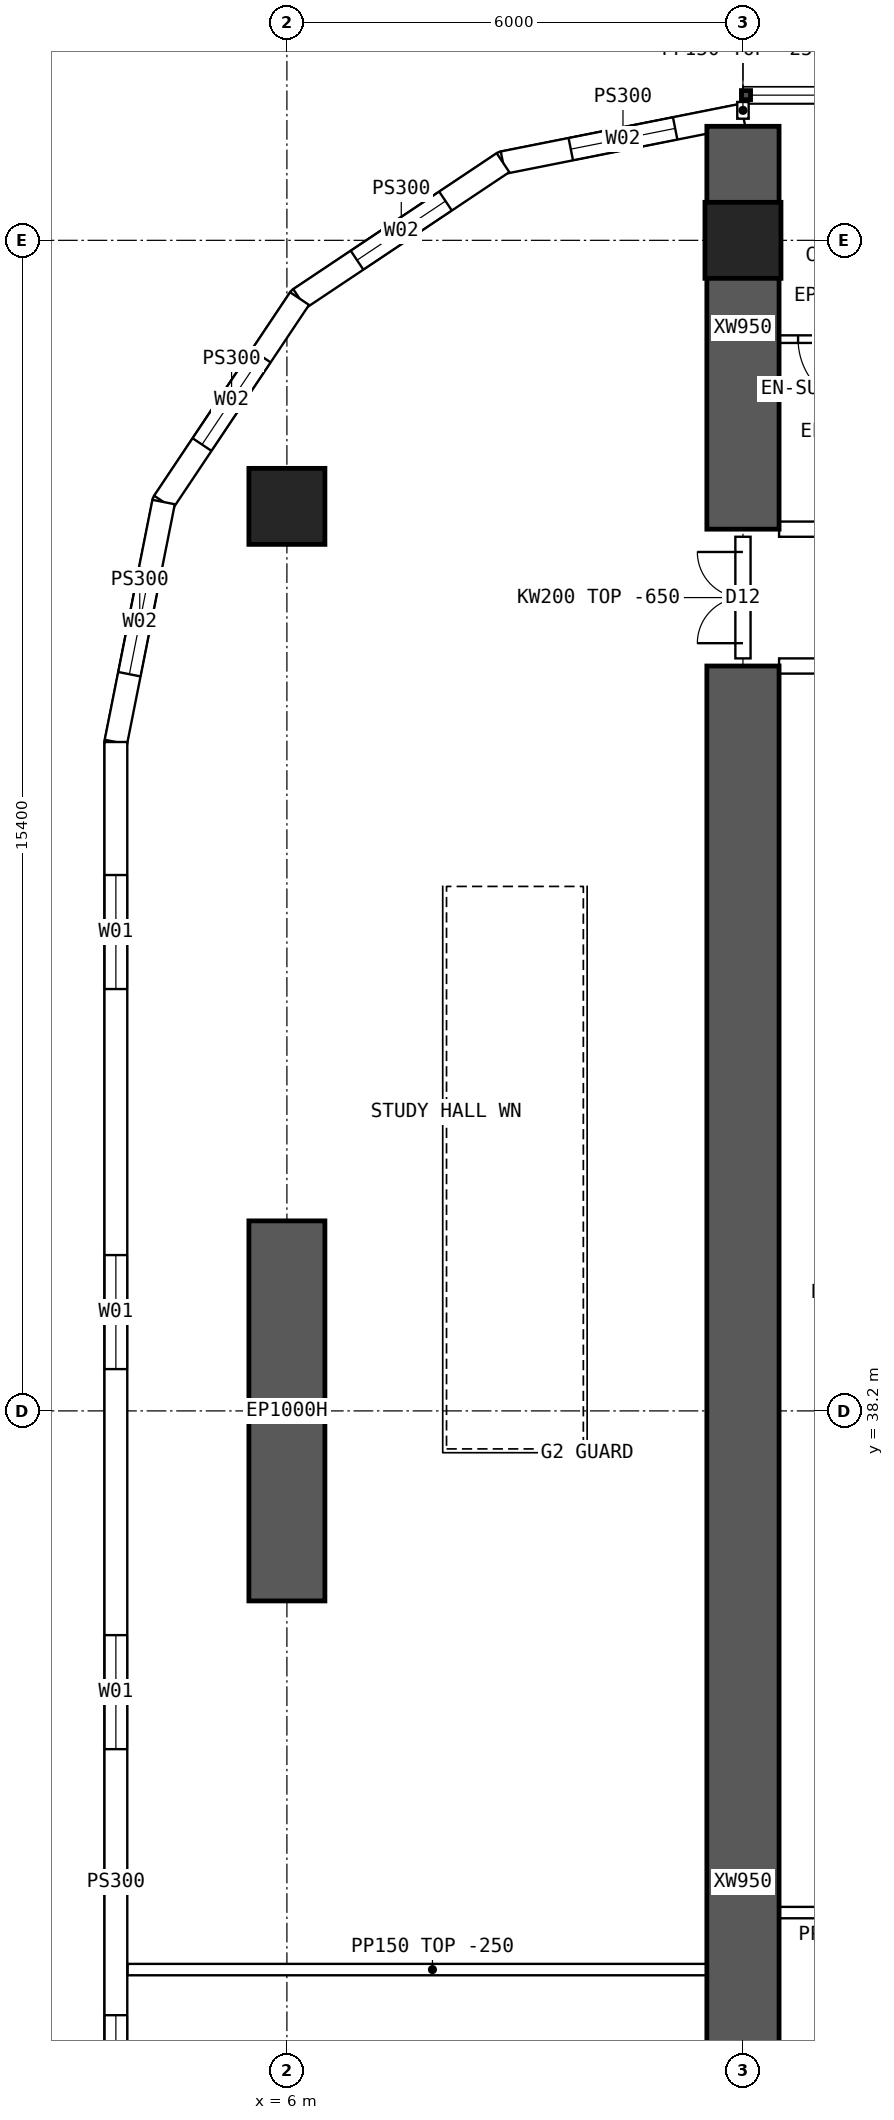
"""IFC4 building model, lengths in metres.
Left out: names, types, materials, properties, quantities, classifications, styles, units other than length and angle.
Written with IfcOpenShell. Run it as: python <this file> out.ifc"""

import sys

from ifc_helpers import new_model, si_unit, direction, frame, frame_2d, origin, origin_2d, place, context, subcontext, project, spatial, polyline, rectangle, hollow_rectangle, outline, extrude, element, fill, save


model = new_model("IFC4")
c1 = context("Model", 3, precision=1e-05, world=origin(), true_north=direction((0.0, 1.0)))
c2 = subcontext(c1, "Body", "Model", "MODEL_VIEW")
j1 = project(units=[si_unit("LENGTHUNIT", "METRE"), si_unit("PLANEANGLEUNIT", "RADIAN")], contexts=[c1])
p1 = place(None, origin())
s1 = spatial("IfcSite", under=j1, at=p1, CompositionType="ELEMENT")
p2 = place(p1, origin())
s2 = spatial("IfcBuilding", under=s1, at=p2, CompositionType="ELEMENT")
p3 = place(p2, frame((0.0, 0.0, 88.15)))
s3 = spatial("IfcBuildingStorey", under=s2, at=p3, CompositionType="ELEMENT", Elevation=88.15)
for number, where, z_axis, x_axis in (
    (1, (12.0, 53.6, 0.0), (0.0, 0.0, 1.0), (1.0, 0.0, 0.0)),
    (2, (6.0, 50.1, 0.0), (0.0, 0.0, 1.0), (1.0, 0.0, 0.0)),
):
    element("IfcColumn", number, at=place(p3, frame(where, z_axis=z_axis, x_axis=x_axis)), inside=s3, PredefinedType="COLUMN", context=c2, shape_type="SweptSolid", body=[
        extrude(hollow_rectangle(XDim=1.0, YDim=1.0, WallThickness=0.1, at=origin_2d()), origin(), (0.0, 0.0, 1.0), 3.75),
    ])
p4 = place(p3, frame((6.0, 35.7, 0.0), z_axis=(0.0, 0.0, 1.0), x_axis=(0.0, 1.0, 0.0)))
e3 = element("IfcWall", 3, at=p4, inside=s3, PredefinedType="SHEAR", context=c2, shape_type="SweptSolid", body=[
    extrude(rectangle(XDim=5.0, YDim=1.0, at=frame_2d((2.5, 0.0))), origin(), (0.0, 0.0, 1.0), 3.75),
])
p5 = place(p3, frame((12.0, 49.8, 0.0), z_axis=(0.0, 0.0, 1.0), x_axis=(0.0, 1.0, 0.0)))
e4 = element("IfcWall", 4, at=p5, inside=s3, PredefinedType="SHEAR", context=c2, shape_type="SweptSolid", body=[
    extrude(rectangle(XDim=5.3, YDim=0.95, at=frame_2d((2.65, 0.0))), origin(), (0.0, 0.0, 1.0), 3.75),
])
p6 = place(p3, frame((12.0, 16.0, 0.0), z_axis=(0.0, 0.0, 1.0), x_axis=(0.0, 1.0, 0.0)))
e5 = element("IfcWall", 5, at=p6, inside=s3, PredefinedType="SHEAR", context=c2, shape_type="SweptSolid", body=[
    extrude(rectangle(XDim=32.0, YDim=0.95, at=frame_2d((16.0, 0.0))), origin(), (0.0, 0.0, 1.0), 3.75),
])
p7 = place(p3, frame((3.75, 47.0, 0.0), z_axis=(0.0, 0.0, 1.0), x_axis=(0.0, -1.0, 0.0)))
e6 = element("IfcWall", 6, at=p7, inside=s3, PredefinedType="SOLIDWALL", context=c2, shape_type="SweptSolid", body=[
    extrude(outline(polyline([(-0.015, -0.15), (30.015, -0.15), (29.985, 0.15), (0.015, 0.15), (-0.015, -0.15)])), origin(), (0.0, 0.0, 1.0), 3.5),
])
p8 = place(p7, frame((1.75, 0.0, 0.9)))
e7 = element("IfcOpeningElement", 7, at=p8, cuts=e6, PredefinedType="OPENING", context=c2, shape_type="SweptSolid", body=[
    extrude(rectangle(XDim=1.5, YDim=2.0, at=frame_2d((0.75, 1.0))), frame((0.0, 0.16, 0.0), z_axis=(0.0, -1.0, 0.0), x_axis=(1.0, 0.0, 0.0)), (0.0, 0.0, 1.0), 0.32),
])
p9 = place(p7, frame((6.75, 0.0, 0.9)))
e8 = element("IfcOpeningElement", 8, at=p9, cuts=e6, PredefinedType="OPENING", context=c2, shape_type="SweptSolid", body=[
    extrude(rectangle(XDim=1.5, YDim=2.0, at=frame_2d((0.75, 1.0))), frame((0.0, 0.16, 0.0), z_axis=(0.0, -1.0, 0.0), x_axis=(1.0, 0.0, 0.0)), (0.0, 0.0, 1.0), 0.32),
])
p10 = place(p7, frame((11.75, 0.0, 0.9)))
e9 = element("IfcOpeningElement", 9, at=p10, cuts=e6, PredefinedType="OPENING", context=c2, shape_type="SweptSolid", body=[
    extrude(rectangle(XDim=1.5, YDim=2.0, at=frame_2d((0.75, 1.0))), frame((0.0, 0.16, 0.0), z_axis=(0.0, -1.0, 0.0), x_axis=(1.0, 0.0, 0.0)), (0.0, 0.0, 1.0), 0.32),
])
p11 = place(p7, frame((16.75, 0.0, 0.9)))
e10 = element("IfcOpeningElement", 10, at=p11, cuts=e6, PredefinedType="OPENING", context=c2, shape_type="SweptSolid", body=[
    extrude(rectangle(XDim=1.5, YDim=2.0, at=frame_2d((0.75, 1.0))), frame((0.0, 0.16, 0.0), z_axis=(0.0, -1.0, 0.0), x_axis=(1.0, 0.0, 0.0)), (0.0, 0.0, 1.0), 0.32),
])
p12 = place(p7, frame((21.75, 0.0, 0.9)))
e11 = element("IfcOpeningElement", 11, at=p12, cuts=e6, PredefinedType="OPENING", context=c2, shape_type="SweptSolid", body=[
    extrude(rectangle(XDim=1.5, YDim=2.0, at=frame_2d((0.75, 1.0))), frame((0.0, 0.16, 0.0), z_axis=(0.0, -1.0, 0.0), x_axis=(1.0, 0.0, 0.0)), (0.0, 0.0, 1.0), 0.32),
])
p13 = place(p7, frame((26.75, 0.0, 0.9)))
e12 = element("IfcOpeningElement", 12, at=p13, cuts=e6, PredefinedType="OPENING", context=c2, shape_type="SweptSolid", body=[
    extrude(rectangle(XDim=1.5, YDim=2.0, at=frame_2d((0.75, 1.0))), frame((0.0, 0.16, 0.0), z_axis=(0.0, -1.0, 0.0), x_axis=(1.0, 0.0, 0.0)), (0.0, 0.0, 1.0), 0.32),
])
p14 = place(p3, frame((12.0, 55.25, 0.0), z_axis=(0.0, 0.0, 1.0), x_axis=(-0.980787251524, -0.195080412259, 0.0)))
e13 = element("IfcWall", 13, at=p14, inside=s3, PredefinedType="SOLIDWALL", context=c2, shape_type="SweptSolid", body=[
    extrude(outline(polyline([(-0.03, -0.15), (3.249, -0.15), (3.189, 0.15), (0.03, 0.15), (-0.03, -0.15)])), origin(), (0.0, 0.0, 1.0), 3.5),
])
p15 = place(p14, frame((0.909, 0.0, 0.9)))
e14 = element("IfcOpeningElement", 14, at=p15, cuts=e13, PredefinedType="OPENING", context=c2, shape_type="SweptSolid", body=[
    extrude(rectangle(XDim=1.4, YDim=1.8, at=frame_2d((0.7, 0.9))), frame((0.0, 0.16, 0.0), z_axis=(0.0, -1.0, 0.0), x_axis=(1.0, 0.0, 0.0)), (0.0, 0.0, 1.0), 0.32),
])
p16 = place(p3, frame((8.843, 54.622, 0.0), z_axis=(0.0, 0.0, 1.0), x_axis=(-0.831443069936, -0.555609954424, 0.0)))
e15 = element("IfcWall", 15, at=p16, inside=s3, PredefinedType="SOLIDWALL", context=c2, shape_type="SweptSolid", body=[
    extrude(outline(polyline([(-0.03, -0.15), (3.249, -0.15), (3.189, 0.15), (0.03, 0.15), (-0.03, -0.15)])), origin(), (0.0, 0.0, 1.0), 3.5),
])
p17 = place(p16, frame((0.909, 0.0, 0.9)))
e16 = element("IfcOpeningElement", 16, at=p17, cuts=e15, PredefinedType="OPENING", context=c2, shape_type="SweptSolid", body=[
    extrude(rectangle(XDim=1.4, YDim=1.8, at=frame_2d((0.7, 0.9))), frame((0.0, 0.16, 0.0), z_axis=(0.0, -1.0, 0.0), x_axis=(1.0, 0.0, 0.0)), (0.0, 0.0, 1.0), 0.32),
])
p18 = place(p3, frame((6.167, 52.833, 0.0), z_axis=(0.0, 0.0, 1.0), x_axis=(-0.555609954424, -0.831443069936, 0.0)))
e17 = element("IfcWall", 17, at=p18, inside=s3, PredefinedType="SOLIDWALL", context=c2, shape_type="SweptSolid", body=[
    extrude(outline(polyline([(-0.03, -0.15), (3.249, -0.15), (3.189, 0.15), (0.03, 0.15), (-0.03, -0.15)])), origin(), (0.0, 0.0, 1.0), 3.5),
])
p19 = place(p18, frame((0.909, 0.0, 0.9)))
e18 = element("IfcOpeningElement", 18, at=p19, cuts=e17, PredefinedType="OPENING", context=c2, shape_type="SweptSolid", body=[
    extrude(rectangle(XDim=1.4, YDim=1.8, at=frame_2d((0.7, 0.9))), frame((0.0, 0.16, 0.0), z_axis=(0.0, -1.0, 0.0), x_axis=(1.0, 0.0, 0.0)), (0.0, 0.0, 1.0), 0.32),
])
p20 = place(p3, frame((4.378, 50.157, 0.0), z_axis=(0.0, 0.0, 1.0), x_axis=(-0.195080412259, -0.980787251524, 0.0)))
e19 = element("IfcWall", 19, at=p20, inside=s3, PredefinedType="SOLIDWALL", context=c2, shape_type="SweptSolid", body=[
    extrude(outline(polyline([(-0.03, -0.15), (3.234, -0.15), (3.204, 0.15), (0.03, 0.15), (-0.03, -0.15)])), origin(), (0.0, 0.0, 1.0), 3.5),
])
p21 = place(p20, frame((0.909, 0.0, 0.9)))
e20 = element("IfcOpeningElement", 20, at=p21, cuts=e19, PredefinedType="OPENING", context=c2, shape_type="SweptSolid", body=[
    extrude(rectangle(XDim=1.4, YDim=1.8, at=frame_2d((0.7, 0.9))), frame((0.0, 0.16, 0.0), z_axis=(0.0, -1.0, 0.0), x_axis=(1.0, 0.0, 0.0)), (0.0, 0.0, 1.0), 0.32),
])
p22 = place(p3, frame((12.475, 49.8, 0.0), z_axis=(0.0, 0.0, 1.0), x_axis=(1.0, 0.0, 0.0)))
e21 = element("IfcWall", 21, at=p22, inside=s3, PredefinedType="SOLIDWALL", context=c2, shape_type="SweptSolid", body=[
    extrude(outline(polyline([(0.0, 0.0), (5.05, 0.0), (5.05, 3.1), (0.0, 3.1), (0.0, 0.0)])), frame((0.0, 0.1, 0.0), z_axis=(0.0, -1.0, 0.0), x_axis=(1.0, 0.0, 0.0)), (0.0, 0.0, 1.0), 0.2),
])
p23 = place(p22, frame((1.45, 0.0, 0.0)))
e22 = element("IfcOpeningElement", 22, at=p23, cuts=e21, PredefinedType="OPENING", context=c2, shape_type="SweptSolid", body=[
    extrude(rectangle(XDim=0.9, YDim=2.1, at=frame_2d((0.45, 1.05))), frame((0.0, 0.11, 0.0), z_axis=(0.0, -1.0, 0.0), x_axis=(1.0, 0.0, 0.0)), (0.0, 0.0, 1.0), 0.22),
])
p24 = place(p22, frame((2.7, 0.0, 0.0)))
e23 = element("IfcOpeningElement", 23, at=p24, cuts=e21, PredefinedType="OPENING", context=c2, shape_type="SweptSolid", body=[
    extrude(rectangle(XDim=0.9, YDim=2.1, at=frame_2d((0.45, 1.05))), frame((0.0, 0.11, 0.0), z_axis=(0.0, -1.0, 0.0), x_axis=(1.0, 0.0, 0.0)), (0.0, 0.0, 1.0), 0.22),
])
p25 = place(p3, frame((12.475, 48.0, 0.0), z_axis=(0.0, 0.0, 1.0), x_axis=(1.0, 0.0, 0.0)))
e24 = element("IfcWall", 24, at=p25, inside=s3, PredefinedType="SOLIDWALL", context=c2, shape_type="SweptSolid", body=[
    extrude(rectangle(XDim=5.05, YDim=0.2, at=frame_2d((2.525, 0.0))), origin(), (0.0, 0.0, 1.0), 3.5),
])
p26 = place(p25, frame((3.325, 0.0, 0.0)))
e25 = element("IfcOpeningElement", 25, at=p26, cuts=e24, PredefinedType="OPENING", context=c2, shape_type="SweptSolid", body=[
    extrude(rectangle(XDim=1.6, YDim=2.1, at=frame_2d((0.8, 1.05))), frame((0.0, 0.11, 0.0), z_axis=(0.0, -1.0, 0.0), x_axis=(1.0, 0.0, 0.0)), (0.0, 0.0, 1.0), 0.22),
])
p27 = place(p3, frame((12.475, 52.3, 0.0), z_axis=(0.0, 0.0, 1.0), x_axis=(1.0, 0.0, 0.0)))
e26 = element("IfcWall", 26, at=p27, inside=s3, PredefinedType="PARTITIONING", context=c2, shape_type="SweptSolid", body=[
    extrude(rectangle(XDim=1.4, YDim=0.1, at=frame_2d((0.7, 0.0))), origin(), (0.0, 0.0, 1.0), 3.5),
])
p28 = place(p27, frame((0.25, 0.0, 0.0)))
e27 = element("IfcOpeningElement", 27, at=p28, cuts=e26, PredefinedType="OPENING", context=c2, shape_type="SweptSolid", body=[
    extrude(rectangle(XDim=0.9, YDim=2.1, at=frame_2d((0.45, 1.05))), frame((0.0, 0.06, 0.0), z_axis=(0.0, -1.0, 0.0), x_axis=(1.0, 0.0, 0.0)), (0.0, 0.0, 1.0), 0.12),
])
p29 = place(p3, frame((12.0, 31.6, 0.0), z_axis=(0.0, 0.0, 1.0), x_axis=(1.0, 0.0, 0.0)))
e28 = element("IfcWall", 28, at=p29, inside=s3, PredefinedType="PARTITIONING", context=c2, shape_type="SweptSolid", body=[
    extrude(rectangle(XDim=3.6, YDim=0.15, at=frame_2d((1.8, 0.0))), origin(), (0.0, 0.0, 1.0), 3.5),
])
p30 = place(p3, frame((3.905, 30.85, 0.0), z_axis=(0.0, 0.0, 1.0), x_axis=(1.0, 0.0, 0.0)))
e29 = element("IfcWall", 29, at=p30, inside=s3, PredefinedType="PARTITIONING", context=c2, shape_type="SweptSolid", body=[
    extrude(outline(polyline([(0.0, 0.0), (8.02, 0.0), (8.02, 3.5), (2.397, 3.5), (2.395, 3.05), (1.797, 3.05), (1.795, 3.5), (0.0, 3.5), (0.0, 0.0)])), frame((0.0, 0.075, 0.0), z_axis=(0.0, -1.0, 0.0), x_axis=(1.0, 0.0, 0.0)), (0.0, 0.0, 1.0), 0.15),
])
p31 = place(p3, frame((12.0, 48.1, 0.0), z_axis=(0.0, 0.0, 1.0), x_axis=(0.0, 1.0, 0.0)))
e30 = element("IfcWall", 30, at=p31, inside=s3, PredefinedType="SOLIDWALL", context=c2, shape_type="SweptSolid", body=[
    extrude(outline(polyline([(0.0, 0.0), (1.6, 0.0), (1.6, 3.1), (0.0, 3.1), (0.0, 0.0)])), frame((0.0, 0.1, 0.0), z_axis=(0.0, -1.0, 0.0), x_axis=(1.0, 0.0, 0.0)), (0.0, 0.0, 1.0), 0.2),
])
p32 = place(p31, frame((0.2, 0.0, 0.0)))
e31 = element("IfcOpeningElement", 31, at=p32, cuts=e30, PredefinedType="OPENING", context=c2, shape_type="SweptSolid", body=[
    extrude(rectangle(XDim=1.2, YDim=2.1, at=frame_2d((0.6, 1.05))), frame((0.0, 0.11, 0.0), z_axis=(0.0, -1.0, 0.0), x_axis=(1.0, 0.0, 0.0)), (0.0, 0.0, 1.0), 0.22),
])
p33 = place(p3, frame((12.0, 55.2, 0.0), z_axis=(0.0, 0.0, 1.0), x_axis=(0.0, 1.0, 0.0)))
e32 = element("IfcWall", 32, at=p33, inside=s3, PredefinedType="PARTITIONING", context=c2, shape_type="SweptSolid", body=[
    extrude(rectangle(XDim=0.22, YDim=0.15, at=frame_2d((0.11, 0.0))), origin(), (0.0, 0.0, 1.0), 3.5),
])
p34 = place(p8, origin())
e33 = element("IfcWindow", 33, at=p34, inside=s3, PartitioningType="SINGLE_PANEL", PredefinedType="WINDOW", context=c2, shape_type="SweptSolid", body=[
    extrude(rectangle(XDim=1.5, YDim=2.0, at=frame_2d((0.75, 1.0))), frame((0.0, 0.03, 0.0), z_axis=(0.0, -1.0, 0.0), x_axis=(1.0, 0.0, 0.0)), (0.0, 0.0, 1.0), 0.06),
])
fill(e7, e33)
p35 = place(p9, origin())
e34 = element("IfcWindow", 34, at=p35, inside=s3, PartitioningType="SINGLE_PANEL", PredefinedType="WINDOW", context=c2, shape_type="SweptSolid", body=[
    extrude(rectangle(XDim=1.5, YDim=2.0, at=frame_2d((0.75, 1.0))), frame((0.0, 0.03, 0.0), z_axis=(0.0, -1.0, 0.0), x_axis=(1.0, 0.0, 0.0)), (0.0, 0.0, 1.0), 0.06),
])
fill(e8, e34)
p36 = place(p10, origin())
e35 = element("IfcWindow", 35, at=p36, inside=s3, PartitioningType="SINGLE_PANEL", PredefinedType="WINDOW", context=c2, shape_type="SweptSolid", body=[
    extrude(rectangle(XDim=1.5, YDim=2.0, at=frame_2d((0.75, 1.0))), frame((0.0, 0.03, 0.0), z_axis=(0.0, -1.0, 0.0), x_axis=(1.0, 0.0, 0.0)), (0.0, 0.0, 1.0), 0.06),
])
fill(e9, e35)
p37 = place(p11, origin())
e36 = element("IfcWindow", 36, at=p37, inside=s3, PartitioningType="SINGLE_PANEL", PredefinedType="WINDOW", context=c2, shape_type="SweptSolid", body=[
    extrude(rectangle(XDim=1.5, YDim=2.0, at=frame_2d((0.75, 1.0))), frame((0.0, 0.03, 0.0), z_axis=(0.0, -1.0, 0.0), x_axis=(1.0, 0.0, 0.0)), (0.0, 0.0, 1.0), 0.06),
])
fill(e10, e36)
p38 = place(p15, origin())
e37 = element("IfcWindow", 37, at=p38, inside=s3, PartitioningType="SINGLE_PANEL", PredefinedType="WINDOW", context=c2, shape_type="SweptSolid", body=[
    extrude(rectangle(XDim=1.4, YDim=1.8, at=frame_2d((0.7, 0.9))), frame((0.0, 0.03, 0.0), z_axis=(0.0, -1.0, 0.0), x_axis=(1.0, 0.0, 0.0)), (0.0, 0.0, 1.0), 0.06),
])
fill(e14, e37)
p39 = place(p17, origin())
e38 = element("IfcWindow", 38, at=p39, inside=s3, PartitioningType="SINGLE_PANEL", PredefinedType="WINDOW", context=c2, shape_type="SweptSolid", body=[
    extrude(rectangle(XDim=1.4, YDim=1.8, at=frame_2d((0.7, 0.9))), frame((0.0, 0.03, 0.0), z_axis=(0.0, -1.0, 0.0), x_axis=(1.0, 0.0, 0.0)), (0.0, 0.0, 1.0), 0.06),
])
fill(e16, e38)
p40 = place(p19, origin())
e39 = element("IfcWindow", 39, at=p40, inside=s3, PartitioningType="SINGLE_PANEL", PredefinedType="WINDOW", context=c2, shape_type="SweptSolid", body=[
    extrude(rectangle(XDim=1.4, YDim=1.8, at=frame_2d((0.7, 0.9))), frame((0.0, 0.03, 0.0), z_axis=(0.0, -1.0, 0.0), x_axis=(1.0, 0.0, 0.0)), (0.0, 0.0, 1.0), 0.06),
])
fill(e18, e39)
p41 = place(p21, origin())
e40 = element("IfcWindow", 40, at=p41, inside=s3, PartitioningType="SINGLE_PANEL", PredefinedType="WINDOW", context=c2, shape_type="SweptSolid", body=[
    extrude(rectangle(XDim=1.4, YDim=1.8, at=frame_2d((0.7, 0.9))), frame((0.0, 0.03, 0.0), z_axis=(0.0, -1.0, 0.0), x_axis=(1.0, 0.0, 0.0)), (0.0, 0.0, 1.0), 0.06),
])
fill(e20, e40)
p42 = place(p28, origin())
e41 = element("IfcDoor", 41, at=p42, inside=s3, OperationType="SINGLE_SWING_RIGHT", PredefinedType="DOOR", context=c2, shape_type="SweptSolid", body=[
    extrude(rectangle(XDim=0.9, YDim=2.1, at=frame_2d((0.45, 1.05))), frame((0.0, 0.025, 0.0), z_axis=(0.0, -1.0, 0.0), x_axis=(1.0, 0.0, 0.0)), (0.0, 0.0, 1.0), 0.05),
])
fill(e27, e41)
p43 = place(p32, origin())
e42 = element("IfcDoor", 42, at=p43, inside=s3, OperationType="DOUBLE_DOOR_SINGLE_SWING", PredefinedType="DOOR", context=c2, shape_type="SweptSolid", body=[
    extrude(rectangle(XDim=1.2, YDim=2.1, at=frame_2d((0.6, 1.05))), frame((0.0, 0.025, 0.0), z_axis=(0.0, -1.0, 0.0), x_axis=(1.0, 0.0, 0.0)), (0.0, 0.0, 1.0), 0.05),
])
fill(e31, e42)
save(model, sys.argv[1])
